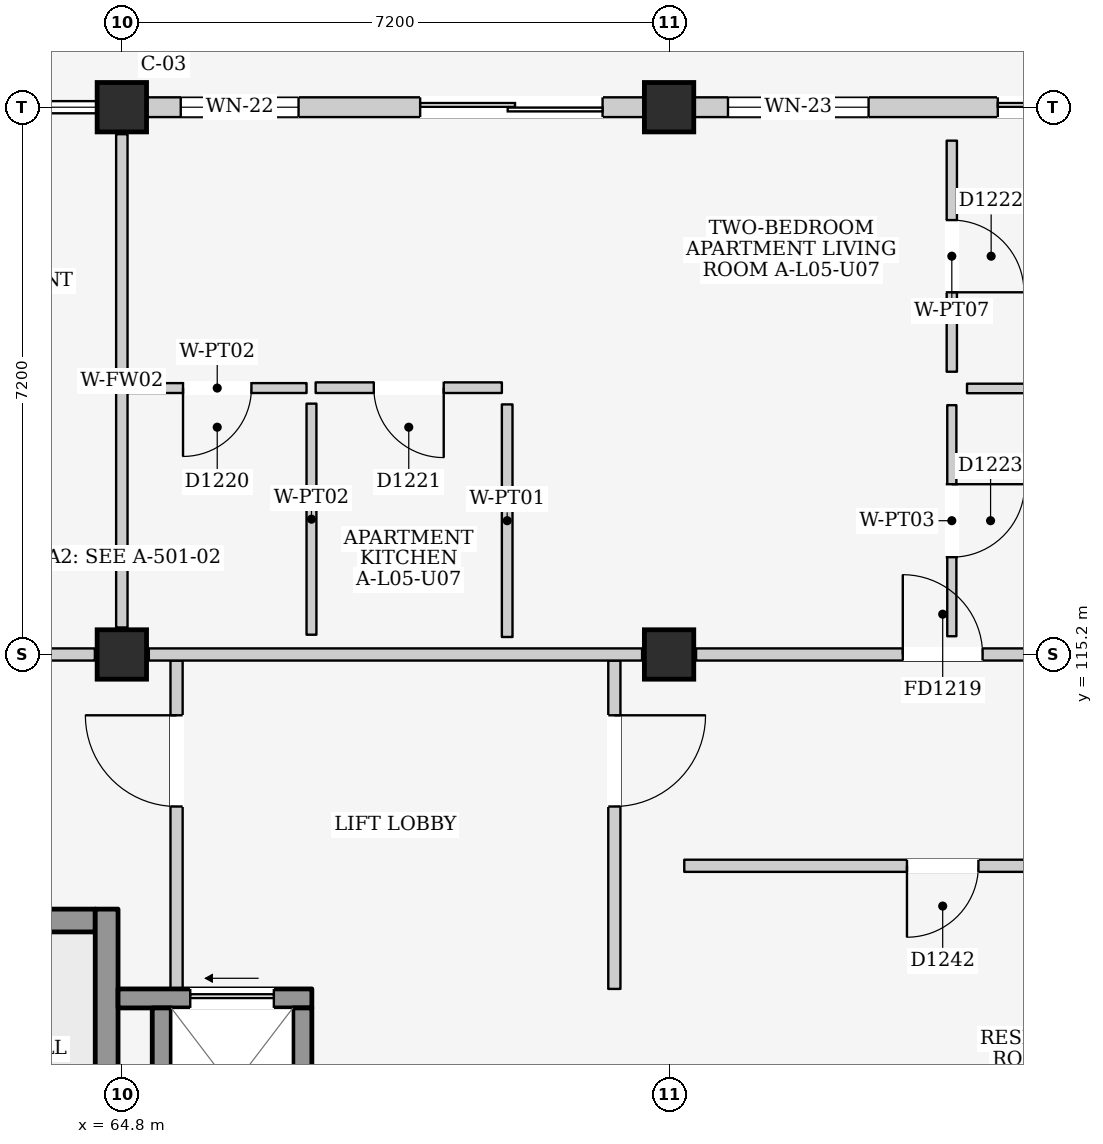
"""IFC4 building model, lengths in metres.
Left out: names, types, materials, properties, quantities, classifications, styles, units other than length and angle.
Written with IfcOpenShell. Run it as: python <this file> out.ifc"""

import sys

from ifc_helpers import new_model, si_unit, direction, frame, frame_2d, origin, origin_2d, place, context, subcontext, project, spatial, rectangle, extrude, element, fill, save


model = new_model("IFC4")
c1 = context("Model", 3, precision=1e-05, world=origin(), true_north=direction((0.0, 1.0)))
c2 = subcontext(c1, "Body", "Model", "MODEL_VIEW")
j1 = project(units=[si_unit("LENGTHUNIT", "METRE"), si_unit("PLANEANGLEUNIT", "RADIAN")], contexts=[c1])
p1 = place(None, origin())
s1 = spatial("IfcSite", under=j1, at=p1, CompositionType="ELEMENT")
p2 = place(p1, origin())
s2 = spatial("IfcBuilding", under=s1, at=p2, CompositionType="ELEMENT")
p3 = place(p2, frame((0.0, 0.0, 18.6)))
s3 = spatial("IfcBuildingStorey", under=s2, at=p3, CompositionType="ELEMENT", Elevation=18.6)
for number, where, z_axis, x_axis in (
    (1, (64.8, 115.2, 0.0), (0.0, 0.0, 1.0), (1.0, 0.0, 0.0)),
    (2, (64.8, 122.4, 0.0), (0.0, 0.0, 1.0), (1.0, 0.0, 0.0)),
    (3, (72.0, 115.2, 0.0), (0.0, 0.0, 1.0), (1.0, 0.0, 0.0)),
    (4, (72.0, 122.4, 0.0), (0.0, 0.0, 1.0), (1.0, 0.0, 0.0)),
):
    element("IfcColumn", number, at=place(p3, frame(where, z_axis=z_axis, x_axis=x_axis)), inside=s3, PredefinedType="COLUMN", context=c2, shape_type="SweptSolid", body=[
        extrude(rectangle(XDim=0.65, YDim=0.65, at=origin_2d()), origin(), (0.0, 0.0, 1.0), 3.3),
    ])
p4 = place(p3, frame((65.125, 122.4, 0.0), z_axis=(0.0, 0.0, 1.0), x_axis=(1.0, 0.0, 0.0)))
e5 = element("IfcWall", 5, at=p4, inside=s3, PredefinedType="ELEMENTEDWALL", context=c2, shape_type="SweptSolid", body=[
    extrude(rectangle(XDim=6.55, YDim=0.26, at=frame_2d((3.275, 0.0))), origin(), (0.0, 0.0, 1.0), 2.595),
])
p5 = place(p4, frame((3.6, 0.0, 0.0)))
e6 = element("IfcOpeningElement", 6, at=p5, cuts=e5, PredefinedType="OPENING", context=c2, shape_type="SweptSolid", body=[
    extrude(rectangle(XDim=2.4, YDim=2.12, at=frame_2d((1.2, 1.06))), frame((0.0, 0.145, 0.0), z_axis=(0.0, -1.0, 0.0), x_axis=(1.0, 0.0, 0.0)), (0.0, 0.0, 1.0), 0.29),
])
p6 = place(p4, frame((0.45, 0.0, 0.9)))
e7 = element("IfcOpeningElement", 7, at=p6, cuts=e5, PredefinedType="OPENING", context=c2, shape_type="SweptSolid", body=[
    extrude(rectangle(XDim=1.55, YDim=1.45, at=frame_2d((0.775, 0.725))), frame((0.0, 0.145, 0.0), z_axis=(0.0, -1.0, 0.0), x_axis=(1.0, 0.0, 0.0)), (0.0, 0.0, 1.0), 0.29),
])
p7 = place(p3, frame((72.325, 122.4, 0.0), z_axis=(0.0, 0.0, 1.0), x_axis=(1.0, 0.0, 0.0)))
e8 = element("IfcWall", 8, at=p7, inside=s3, PredefinedType="ELEMENTEDWALL", context=c2, shape_type="SweptSolid", body=[
    extrude(rectangle(XDim=6.55, YDim=0.26, at=frame_2d((3.275, 0.0))), origin(), (0.0, 0.0, 1.0), 2.595),
])
p8 = place(p7, frame((4.0, 0.0, 0.0)))
e9 = element("IfcOpeningElement", 9, at=p8, cuts=e8, PredefinedType="OPENING", context=c2, shape_type="SweptSolid", body=[
    extrude(rectangle(XDim=2.0, YDim=2.12, at=frame_2d((1.0, 1.06))), frame((0.0, 0.145, 0.0), z_axis=(0.0, -1.0, 0.0), x_axis=(1.0, 0.0, 0.0)), (0.0, 0.0, 1.0), 0.29),
])
p9 = place(p7, frame((0.45, 0.0, 0.9)))
e10 = element("IfcOpeningElement", 10, at=p9, cuts=e8, PredefinedType="OPENING", context=c2, shape_type="SweptSolid", body=[
    extrude(rectangle(XDim=1.85, YDim=1.4, at=frame_2d((0.925, 0.7))), frame((0.0, 0.145, 0.0), z_axis=(0.0, -1.0, 0.0), x_axis=(1.0, 0.0, 0.0)), (0.0, 0.0, 1.0), 0.29),
])
p10 = place(p3, frame((57.95, 111.7, 0.0), z_axis=(0.0, 0.0, 1.0), x_axis=(1.0, 0.0, 0.0)))
e11 = element("IfcWall", 11, at=p10, inside=s3, PredefinedType="SHEAR", context=c2, shape_type="SweptSolid", body=[
    extrude(rectangle(XDim=6.5, YDim=0.3, at=frame_2d((3.25, 0.0))), origin(), (0.0, 0.0, 1.0), 3.06),
])
p11 = place(p10, frame((0.18, 0.0, 0.0)))
e12 = element("IfcOpeningElement", 12, at=p11, cuts=e11, PredefinedType="OPENING", context=c2, shape_type="SweptSolid", body=[
    extrude(rectangle(XDim=1.15, YDim=2.2, at=frame_2d((0.575, 1.1))), frame((0.0, 0.165, 0.0), z_axis=(0.0, -1.0, 0.0), x_axis=(1.0, 0.0, 0.0)), (0.0, 0.0, 1.0), 0.33),
])
p12 = place(p3, frame((64.6, 108.15, 0.0), z_axis=(0.0, 0.0, 1.0), x_axis=(0.0, 1.0, 0.0)))
e13 = element("IfcWall", 13, at=p12, inside=s3, PredefinedType="SHEAR", context=c2, shape_type="SweptSolid", body=[
    extrude(rectangle(XDim=3.7, YDim=0.3, at=frame_2d((1.85, 0.0))), origin(), (0.0, 0.0, 1.0), 3.06),
])
p13 = place(p3, frame((65.52, 110.8, 0.0), z_axis=(0.0, 0.0, 1.0), x_axis=(0.0, 1.0, 0.0)))
e14 = element("IfcWall", 14, at=p13, inside=s3, PredefinedType="PARTITIONING", context=c2, shape_type="SweptSolid", body=[
    extrude(rectangle(XDim=4.32, YDim=0.16, at=frame_2d((2.16, 0.0))), origin(), (0.0, 0.0, 1.0), 3.06),
])
p14 = place(p13, frame((2.4, 0.0, 0.0)))
e15 = element("IfcOpeningElement", 15, at=p14, cuts=e14, PredefinedType="OPENING", context=c2, shape_type="SweptSolid", body=[
    extrude(rectangle(XDim=1.2, YDim=2.2, at=frame_2d((0.6, 1.1))), frame((0.0, 0.095, 0.0), z_axis=(0.0, -1.0, 0.0), x_axis=(1.0, 0.0, 0.0)), (0.0, 0.0, 1.0), 0.19),
])
p15 = place(p3, frame((71.28, 110.8, 0.0), z_axis=(0.0, 0.0, 1.0), x_axis=(0.0, 1.0, 0.0)))
e16 = element("IfcWall", 16, at=p15, inside=s3, PredefinedType="PARTITIONING", context=c2, shape_type="SweptSolid", body=[
    extrude(rectangle(XDim=4.32, YDim=0.16, at=frame_2d((2.16, 0.0))), origin(), (0.0, 0.0, 1.0), 3.06),
])
p16 = place(p15, frame((2.4, 0.0, 0.0)))
e17 = element("IfcOpeningElement", 17, at=p16, cuts=e16, PredefinedType="OPENING", context=c2, shape_type="SweptSolid", body=[
    extrude(rectangle(XDim=1.2, YDim=2.2, at=frame_2d((0.6, 1.1))), frame((0.0, 0.095, 0.0), z_axis=(0.0, -1.0, 0.0), x_axis=(1.0, 0.0, 0.0)), (0.0, 0.0, 1.0), 0.19),
])
p17 = place(p3, frame((64.75, 110.675, 0.0), z_axis=(0.0, 0.0, 1.0), x_axis=(1.0, 0.0, 0.0)))
e18 = element("IfcWall", 18, at=p17, inside=s3, PredefinedType="SHEAR", context=c2, shape_type="SweptSolid", body=[
    extrude(rectangle(XDim=2.55, YDim=0.25, at=frame_2d((1.275, 0.0))), origin(), (0.0, 0.0, 1.0), 3.06),
])
p18 = place(p17, frame((0.95, 0.0, 0.0)))
e19 = element("IfcOpeningElement", 19, at=p18, cuts=e18, PredefinedType="OPENING", context=c2, shape_type="SweptSolid", body=[
    extrude(rectangle(XDim=1.1, YDim=2.15, at=frame_2d((0.55, 1.075))), frame((0.0, 0.14, 0.0), z_axis=(0.0, -1.0, 0.0), x_axis=(1.0, 0.0, 0.0)), (0.0, 0.0, 1.0), 0.28),
])
for number, where, z_axis, x_axis in (
    (20, (65.325, 108.45, 0.0), (0.0, 0.0, 1.0), (0.0, 1.0, 0.0)),
    (21, (67.175, 108.45, 0.0), (0.0, 0.0, 1.0), (0.0, 1.0, 0.0)),
):
    element("IfcWall", number, at=place(p3, frame(where, z_axis=z_axis, x_axis=x_axis)), inside=s3, PredefinedType="SHEAR", context=c2, shape_type="SweptSolid", body=[
        extrude(rectangle(XDim=2.1, YDim=0.25, at=frame_2d((1.05, 0.0))), origin(), (0.0, 0.0, 1.0), 3.06),
    ])
p19 = place(p3, frame((57.955, 115.2, 0.0), z_axis=(0.0, 0.0, 1.0), x_axis=(1.0, 0.0, 0.0)))
e22 = element("IfcWall", 22, at=p19, inside=s3, PredefinedType="PARTITIONING", context=c2, shape_type="SweptSolid", body=[
    extrude(rectangle(XDim=6.49, YDim=0.16, at=frame_2d((3.245, 0.0))), origin(), (0.0, 0.0, 1.0), 2.395),
])
p20 = place(p19, frame((2.72, 0.0, 0.0)))
e23 = element("IfcOpeningElement", 23, at=p20, cuts=e22, PredefinedType="OPENING", context=c2, shape_type="SweptSolid", body=[
    extrude(rectangle(XDim=1.05, YDim=2.15, at=frame_2d((0.525, 1.075))), frame((0.0, 0.095, 0.0), z_axis=(0.0, -1.0, 0.0), x_axis=(1.0, 0.0, 0.0)), (0.0, 0.0, 1.0), 0.19),
])
p21 = place(p3, frame((64.8, 115.555, 0.0), z_axis=(0.0, 0.0, 1.0), x_axis=(0.0, 1.0, 0.0)))
e24 = element("IfcWall", 24, at=p21, inside=s3, PredefinedType="PARTITIONING", context=c2, shape_type="SweptSolid", body=[
    extrude(rectangle(XDim=6.49, YDim=0.15, at=frame_2d((3.245, 0.0))), origin(), (0.0, 0.0, 1.0), 2.545),
])
p22 = place(p3, frame((65.155, 115.2, 0.0), z_axis=(0.0, 0.0, 1.0), x_axis=(1.0, 0.0, 0.0)))
e25 = element("IfcWall", 25, at=p22, inside=s3, PredefinedType="PARTITIONING", context=c2, shape_type="SweptSolid", body=[
    extrude(rectangle(XDim=6.49, YDim=0.16, at=frame_2d((3.245, 0.0))), origin(), (0.0, 0.0, 1.0), 2.395),
])
p23 = place(p3, frame((72.355, 115.2, 0.0), z_axis=(0.0, 0.0, 1.0), x_axis=(1.0, 0.0, 0.0)))
e26 = element("IfcWall", 26, at=p23, inside=s3, PredefinedType="PARTITIONING", context=c2, shape_type="SweptSolid", body=[
    extrude(rectangle(XDim=6.49, YDim=0.16, at=frame_2d((3.245, 0.0))), origin(), (0.0, 0.0, 1.0), 2.395),
])
p24 = place(p23, frame((2.72, 0.0, 0.0)))
e27 = element("IfcOpeningElement", 27, at=p24, cuts=e26, PredefinedType="OPENING", context=c2, shape_type="SweptSolid", body=[
    extrude(rectangle(XDim=1.05, YDim=2.15, at=frame_2d((0.525, 1.075))), frame((0.0, 0.095, 0.0), z_axis=(0.0, -1.0, 0.0), x_axis=(1.0, 0.0, 0.0)), (0.0, 0.0, 1.0), 0.19),
])
p25 = place(p3, frame((64.88, 118.705, 0.0), z_axis=(0.0, 0.0, 1.0), x_axis=(1.0, 0.0, 0.0)))
e28 = element("IfcWall", 28, at=p25, inside=s3, PredefinedType="PARTITIONING", context=c2, shape_type="SweptSolid", body=[
    extrude(rectangle(XDim=2.35, YDim=0.13, at=frame_2d((1.175, 0.0))), origin(), (0.0, 0.0, 1.0), 3.06),
])
p26 = place(p25, frame((0.725, 0.0, 0.0)))
e29 = element("IfcOpeningElement", 29, at=p26, cuts=e28, PredefinedType="OPENING", context=c2, shape_type="SweptSolid", body=[
    extrude(rectangle(XDim=0.9, YDim=2.1, at=frame_2d((0.45, 1.05))), frame((0.0, 0.08, 0.0), z_axis=(0.0, -1.0, 0.0), x_axis=(1.0, 0.0, 0.0)), (0.0, 0.0, 1.0), 0.16),
])
p27 = place(p3, frame((67.295, 115.46, 0.0), z_axis=(0.0, 0.0, 1.0), x_axis=(0.0, 1.0, 0.0)))
e30 = element("IfcWall", 30, at=p27, inside=s3, PredefinedType="PARTITIONING", context=c2, shape_type="SweptSolid", body=[
    extrude(rectangle(XDim=3.04, YDim=0.13, at=frame_2d((1.52, 0.0))), origin(), (0.0, 0.0, 1.0), 3.06),
])
p28 = place(p3, frame((67.35, 118.71, 0.0), z_axis=(0.0, 0.0, 1.0), x_axis=(1.0, 0.0, 0.0)))
e31 = element("IfcWall", 31, at=p28, inside=s3, PredefinedType="PARTITIONING", context=c2, shape_type="SweptSolid", body=[
    extrude(rectangle(XDim=2.45, YDim=0.14, at=frame_2d((1.225, 0.0))), origin(), (0.0, 0.0, 1.0), 3.06),
])
p29 = place(p28, frame((0.765, 0.0, 0.0)))
e32 = element("IfcOpeningElement", 32, at=p29, cuts=e31, PredefinedType="OPENING", context=c2, shape_type="SweptSolid", body=[
    extrude(rectangle(XDim=0.92, YDim=2.1, at=frame_2d((0.46, 1.05))), frame((0.0, 0.085, 0.0), z_axis=(0.0, -1.0, 0.0), x_axis=(1.0, 0.0, 0.0)), (0.0, 0.0, 1.0), 0.17),
])
p30 = place(p3, frame((69.87, 115.43, 0.0), z_axis=(0.0, 0.0, 1.0), x_axis=(0.0, 1.0, 0.0)))
e33 = element("IfcWall", 33, at=p30, inside=s3, PredefinedType="PARTITIONING", context=c2, shape_type="SweptSolid", body=[
    extrude(rectangle(XDim=3.06, YDim=0.14, at=frame_2d((1.53, 0.0))), origin(), (0.0, 0.0, 1.0), 3.06),
])
p31 = place(p3, frame((75.72, 118.92, 0.0), z_axis=(0.0, 0.0, 1.0), x_axis=(0.0, 1.0, 0.0)))
e34 = element("IfcWall", 34, at=p31, inside=s3, PredefinedType="PARTITIONING", context=c2, shape_type="SweptSolid", body=[
    extrude(rectangle(XDim=3.04, YDim=0.135, at=frame_2d((1.52, 0.0))), origin(), (0.0, 0.0, 1.0), 3.06),
])
p32 = place(p31, frame((1.045, 0.0, 0.0)))
e35 = element("IfcOpeningElement", 35, at=p32, cuts=e34, PredefinedType="OPENING", context=c2, shape_type="SweptSolid", body=[
    extrude(rectangle(XDim=0.95, YDim=2.15, at=frame_2d((0.475, 1.075))), frame((0.0, 0.083, 0.0), z_axis=(0.0, -1.0, 0.0), x_axis=(1.0, 0.0, 0.0)), (0.0, 0.0, 1.0), 0.165),
])
p33 = place(p3, frame((75.92, 118.7, 0.0), z_axis=(0.0, 0.0, 1.0), x_axis=(1.0, 0.0, 0.0)))
e36 = element("IfcWall", 36, at=p33, inside=s3, PredefinedType="PARTITIONING", context=c2, shape_type="SweptSolid", body=[
    extrude(rectangle(XDim=3.06, YDim=0.125, at=frame_2d((1.53, 0.0))), origin(), (0.0, 0.0, 1.0), 3.06),
])
p34 = place(p3, frame((75.72, 115.44, 0.0), z_axis=(0.0, 0.0, 1.0), x_axis=(0.0, 1.0, 0.0)))
e37 = element("IfcWall", 37, at=p34, inside=s3, PredefinedType="PARTITIONING", context=c2, shape_type="SweptSolid", body=[
    extrude(rectangle(XDim=3.04, YDim=0.12, at=frame_2d((1.52, 0.0))), origin(), (0.0, 0.0, 1.0), 3.06),
])
p35 = place(p34, frame((1.04, 0.0, 0.0)))
e38 = element("IfcOpeningElement", 38, at=p35, cuts=e37, PredefinedType="OPENING", context=c2, shape_type="SweptSolid", body=[
    extrude(rectangle(XDim=0.96, YDim=2.15, at=frame_2d((0.48, 1.075))), frame((0.0, 0.075, 0.0), z_axis=(0.0, -1.0, 0.0), x_axis=(1.0, 0.0, 0.0)), (0.0, 0.0, 1.0), 0.15),
])
p36 = place(p3, frame((72.2, 112.42, 0.0), z_axis=(0.0, 0.0, 1.0), x_axis=(1.0, 0.0, 0.0)))
e39 = element("IfcWall", 39, at=p36, inside=s3, PredefinedType="PARTITIONING", context=c2, shape_type="SweptSolid", body=[
    extrude(rectangle(XDim=6.8, YDim=0.16, at=frame_2d((3.4, 0.0))), origin(), (0.0, 0.0, 1.0), 3.06),
])
p37 = place(p36, frame((2.93, 0.0, 0.0)))
e40 = element("IfcOpeningElement", 40, at=p37, cuts=e39, PredefinedType="OPENING", context=c2, shape_type="SweptSolid", body=[
    extrude(rectangle(XDim=0.94, YDim=2.12, at=frame_2d((0.47, 1.06))), frame((0.0, 0.095, 0.0), z_axis=(0.0, -1.0, 0.0), x_axis=(1.0, 0.0, 0.0)), (0.0, 0.0, 1.0), 0.19),
])
p38 = place(p5, frame((2.4, 0.0, 0.0), z_axis=(0.0, 0.0, 1.0), x_axis=(-1.0, 0.0, 0.0)))
e41 = element("IfcDoor", 41, at=p38, inside=s3, OperationType="DOUBLE_DOOR_SLIDING", PredefinedType="DOOR", context=c2, shape_type="SweptSolid", body=[
    extrude(rectangle(XDim=2.4, YDim=2.12, at=frame_2d((1.2, 1.06))), frame((0.0, 0.025, 0.0), z_axis=(0.0, -1.0, 0.0), x_axis=(1.0, 0.0, 0.0)), (0.0, 0.0, 1.0), 0.05),
])
fill(e6, e41)
p39 = place(p6, origin())
e42 = element("IfcWindow", 42, at=p39, inside=s3, PartitioningType="DOUBLE_PANEL_VERTICAL", PredefinedType="WINDOW", context=c2, shape_type="SweptSolid", body=[
    extrude(rectangle(XDim=1.55, YDim=1.45, at=frame_2d((0.775, 0.725))), frame((0.0, 0.03, 0.0), z_axis=(0.0, -1.0, 0.0), x_axis=(1.0, 0.0, 0.0)), (0.0, 0.0, 1.0), 0.06),
])
fill(e7, e42)
p40 = place(p8, frame((2.0, 0.0, 0.0), z_axis=(0.0, 0.0, 1.0), x_axis=(-1.0, 0.0, 0.0)))
e43 = element("IfcDoor", 43, at=p40, inside=s3, OperationType="DOUBLE_DOOR_SLIDING", PredefinedType="DOOR", context=c2, shape_type="SweptSolid", body=[
    extrude(rectangle(XDim=2.0, YDim=2.12, at=frame_2d((1.0, 1.06))), frame((0.0, 0.025, 0.0), z_axis=(0.0, -1.0, 0.0), x_axis=(1.0, 0.0, 0.0)), (0.0, 0.0, 1.0), 0.05),
])
fill(e9, e43)
p41 = place(p9, origin())
e44 = element("IfcWindow", 44, at=p41, inside=s3, PartitioningType="DOUBLE_PANEL_VERTICAL", PredefinedType="WINDOW", context=c2, shape_type="SweptSolid", body=[
    extrude(rectangle(XDim=1.85, YDim=1.4, at=frame_2d((0.925, 0.7))), frame((0.0, 0.03, 0.0), z_axis=(0.0, -1.0, 0.0), x_axis=(1.0, 0.0, 0.0)), (0.0, 0.0, 1.0), 0.06),
])
fill(e10, e44)
p42 = place(p14, origin())
e45 = element("IfcDoor", 45, at=p42, inside=s3, OperationType="SINGLE_SWING_RIGHT", PredefinedType="DOOR", context=c2, shape_type="SweptSolid", body=[
    extrude(rectangle(XDim=1.2, YDim=2.2, at=frame_2d((0.6, 1.1))), frame((0.0, 0.025, 0.0), z_axis=(0.0, -1.0, 0.0), x_axis=(1.0, 0.0, 0.0)), (0.0, 0.0, 1.0), 0.05),
])
fill(e15, e45)
p43 = place(p16, frame((1.2, 0.0, 0.0), z_axis=(0.0, 0.0, 1.0), x_axis=(-1.0, 0.0, 0.0)))
e46 = element("IfcDoor", 46, at=p43, inside=s3, OperationType="SINGLE_SWING_LEFT", PredefinedType="DOOR", context=c2, shape_type="SweptSolid", body=[
    extrude(rectangle(XDim=1.2, YDim=2.2, at=frame_2d((0.6, 1.1))), frame((0.0, 0.025, 0.0), z_axis=(0.0, -1.0, 0.0), x_axis=(1.0, 0.0, 0.0)), (0.0, 0.0, 1.0), 0.05),
])
fill(e17, e46)
p44 = place(p18, origin())
e47 = element("IfcDoor", 47, at=p44, inside=s3, OperationType="SLIDING_TO_LEFT", PredefinedType="DOOR", context=c2, shape_type="SweptSolid", body=[
    extrude(rectangle(XDim=1.1, YDim=2.15, at=frame_2d((0.55, 1.075))), frame((0.0, 0.025, 0.0), z_axis=(0.0, -1.0, 0.0), x_axis=(1.0, 0.0, 0.0)), (0.0, 0.0, 1.0), 0.05),
])
fill(e19, e47)
p45 = place(p24, origin())
e48 = element("IfcDoor", 48, at=p45, inside=s3, OperationType="SINGLE_SWING_LEFT", PredefinedType="DOOR", context=c2, shape_type="SweptSolid", body=[
    extrude(rectangle(XDim=1.05, YDim=2.15, at=frame_2d((0.525, 1.075))), frame((0.0, 0.025, 0.0), z_axis=(0.0, -1.0, 0.0), x_axis=(1.0, 0.0, 0.0)), (0.0, 0.0, 1.0), 0.05),
])
fill(e27, e48)
p46 = place(p26, frame((0.9, 0.0, 0.0), z_axis=(0.0, 0.0, 1.0), x_axis=(-1.0, 0.0, 0.0)))
e49 = element("IfcDoor", 49, at=p46, inside=s3, OperationType="SINGLE_SWING_RIGHT", PredefinedType="DOOR", context=c2, shape_type="SweptSolid", body=[
    extrude(rectangle(XDim=0.9, YDim=2.1, at=frame_2d((0.45, 1.05))), frame((0.0, 0.025, 0.0), z_axis=(0.0, -1.0, 0.0), x_axis=(1.0, 0.0, 0.0)), (0.0, 0.0, 1.0), 0.05),
])
fill(e29, e49)
p47 = place(p29, frame((0.92, 0.0, 0.0), z_axis=(0.0, 0.0, 1.0), x_axis=(-1.0, 0.0, 0.0)))
e50 = element("IfcDoor", 50, at=p47, inside=s3, OperationType="SINGLE_SWING_LEFT", PredefinedType="DOOR", context=c2, shape_type="SweptSolid", body=[
    extrude(rectangle(XDim=0.92, YDim=2.1, at=frame_2d((0.46, 1.05))), frame((0.0, 0.025, 0.0), z_axis=(0.0, -1.0, 0.0), x_axis=(1.0, 0.0, 0.0)), (0.0, 0.0, 1.0), 0.05),
])
fill(e32, e50)
p48 = place(p32, frame((0.95, 0.0, 0.0), z_axis=(0.0, 0.0, 1.0), x_axis=(-1.0, 0.0, 0.0)))
e51 = element("IfcDoor", 51, at=p48, inside=s3, OperationType="SINGLE_SWING_RIGHT", PredefinedType="DOOR", context=c2, shape_type="SweptSolid", body=[
    extrude(rectangle(XDim=0.95, YDim=2.15, at=frame_2d((0.475, 1.075))), frame((0.0, 0.025, 0.0), z_axis=(0.0, -1.0, 0.0), x_axis=(1.0, 0.0, 0.0)), (0.0, 0.0, 1.0), 0.05),
])
fill(e35, e51)
p49 = place(p35, frame((0.96, 0.0, 0.0), z_axis=(0.0, 0.0, 1.0), x_axis=(-1.0, 0.0, 0.0)))
e52 = element("IfcDoor", 52, at=p49, inside=s3, OperationType="SINGLE_SWING_LEFT", PredefinedType="DOOR", context=c2, shape_type="SweptSolid", body=[
    extrude(rectangle(XDim=0.96, YDim=2.15, at=frame_2d((0.48, 1.075))), frame((0.0, 0.025, 0.0), z_axis=(0.0, -1.0, 0.0), x_axis=(1.0, 0.0, 0.0)), (0.0, 0.0, 1.0), 0.05),
])
fill(e38, e52)
p50 = place(p37, frame((0.94, 0.0, 0.0), z_axis=(0.0, 0.0, 1.0), x_axis=(-1.0, 0.0, 0.0)))
e53 = element("IfcDoor", 53, at=p50, inside=s3, OperationType="SINGLE_SWING_RIGHT", PredefinedType="DOOR", context=c2, shape_type="SweptSolid", body=[
    extrude(rectangle(XDim=0.94, YDim=2.12, at=frame_2d((0.47, 1.06))), frame((0.0, 0.025, 0.0), z_axis=(0.0, -1.0, 0.0), x_axis=(1.0, 0.0, 0.0)), (0.0, 0.0, 1.0), 0.05),
])
fill(e40, e53)
save(model, sys.argv[1])
